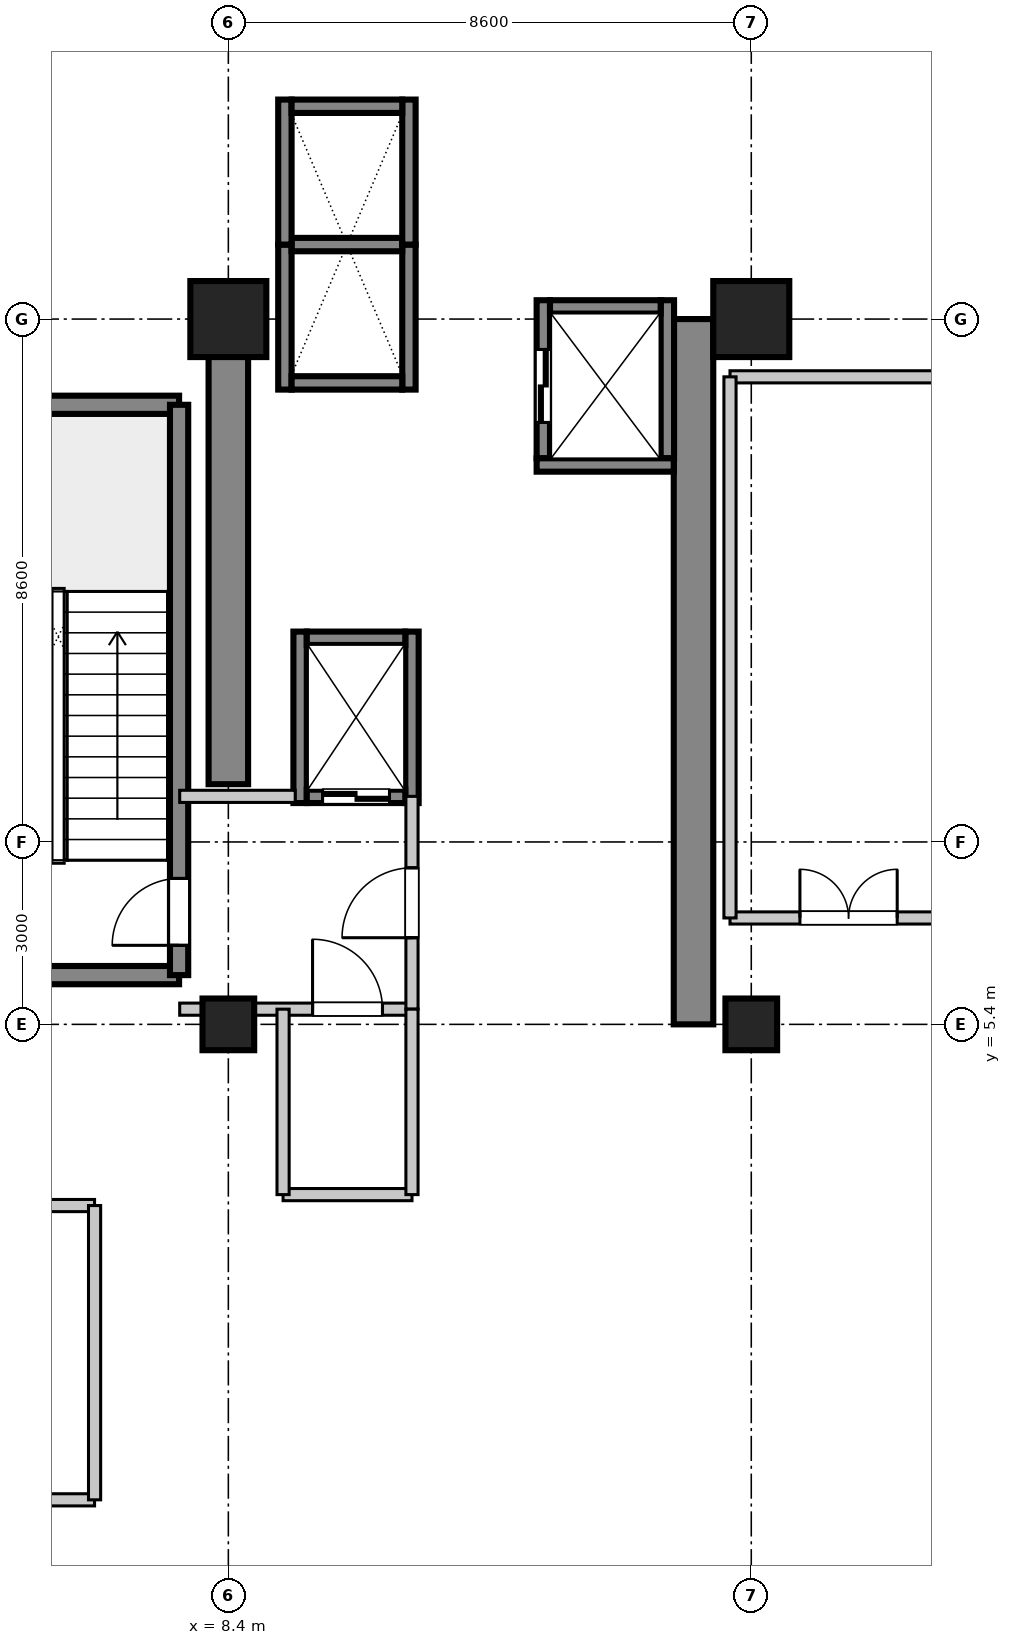
"""IFC4 building model, lengths in metres.
Left out: names, types, materials, properties, quantities, classifications, styles, units other than length and angle.
Written with IfcOpenShell. Run it as: python <this file> out.ifc"""

import sys

from ifc_helpers import new_model, si_unit, direction, frame, frame_2d, origin, origin_2d, place, context, subcontext, project, spatial, rectangle, i_section, extrude, source, transform, mapped, element, fill, save


model = new_model("IFC4")
c1 = context("Model", 3, precision=1e-05, world=origin(), true_north=direction((0.0, 1.0)))
c2 = subcontext(c1, "Body", "Model", "MODEL_VIEW")
j1 = project(units=[si_unit("LENGTHUNIT", "METRE"), si_unit("PLANEANGLEUNIT", "RADIAN")], contexts=[c1])
p1 = place(None, origin())
s1 = spatial("IfcSite", under=j1, at=p1, CompositionType="ELEMENT")
p2 = place(p1, origin())
s2 = spatial("IfcBuilding", under=s1, at=p2, CompositionType="ELEMENT")
p3 = place(p2, frame((0.0, 0.0, 144.2)))
s3 = spatial("IfcBuildingStorey", under=s2, at=p3, CompositionType="ELEMENT", Elevation=144.2)
m1 = source(origin(), c2, "Body", "SweptSolid", [
    extrude(rectangle(XDim=0.85, YDim=0.85, at=origin_2d()), origin(), (0.0, 0.0, 1.0), 4.755),
])
p4 = place(p3, frame((8.4, 5.4, 0.0), z_axis=(0.0, 0.0, 1.0), x_axis=(1.0, 0.0, 0.0)))
e1 = element("IfcColumn", 1, at=p4, inside=s3, PredefinedType="PILASTER", context=c2, shape_type="MappedRepresentation", body=[
    mapped(m1, transform((0.0, 0.0, 0.0), scale=1.0)),
])
m2 = source(origin(), c2, "Body", "SweptSolid", [
    extrude(rectangle(XDim=1.25, YDim=1.25, at=origin_2d()), origin(), (0.0, 0.0, 1.0), 4.755),
])
p5 = place(p3, frame((8.4, 17.0, 0.0), z_axis=(0.0, 0.0, 1.0), x_axis=(1.0, 0.0, 0.0)))
e2 = element("IfcColumn", 2, at=p5, inside=s3, PredefinedType="COLUMN", context=c2, shape_type="MappedRepresentation", body=[
    mapped(m2, transform((0.0, 0.0, 0.0), scale=1.0)),
])
p6 = place(p3, frame((17.0, 5.4, 0.0), z_axis=(0.0, 0.0, 1.0), x_axis=(1.0, 0.0, 0.0)))
e3 = element("IfcColumn", 3, at=p6, inside=s3, PredefinedType="PILASTER", context=c2, shape_type="MappedRepresentation", body=[
    mapped(m1, transform((0.0, 0.0, 0.0), scale=1.0)),
])
p7 = place(p3, frame((17.0, 17.0, 0.0), z_axis=(0.0, 0.0, 1.0), x_axis=(1.0, 0.0, 0.0)))
e4 = element("IfcColumn", 4, at=p7, inside=s3, PredefinedType="COLUMN", context=c2, shape_type="MappedRepresentation", body=[
    mapped(m2, transform((0.0, 0.0, 0.0), scale=1.0)),
])
m3 = source(origin(), c2, "Body", "SweptSolid", [
    extrude(i_section(OverallWidth=0.409, OverallDepth=0.43, WebThickness=0.021, FlangeThickness=0.034, at=origin_2d()), origin(), (0.0, 0.0, 1.0), 4.732),
])
p8 = place(p3, frame((20.45, 20.45, 0.0), z_axis=(-0.126773471153, -0.126773471153, 0.983797222005), x_axis=(0.991898611002, -0.008101388998, 0.126773471153)))
e5 = element("IfcColumn", 5, at=p8, inside=s3, PredefinedType="COLUMN", context=c2, shape_type="MappedRepresentation", body=[
    mapped(m3, transform((0.0, 0.0, 0.0), scale=1.0)),
])
m4 = source(origin(), c2, "Body", "SweptSolid", [
    extrude(rectangle(XDim=7.65, YDim=0.65, at=frame_2d((3.825, 0.0))), origin(), (0.0, 0.0, 1.0), 4.54),
])
p9 = place(p3, frame((8.4, 9.35, 0.0), z_axis=(0.0, 0.0, 1.0), x_axis=(0.0, 1.0, 0.0)))
e6 = element("IfcWall", 6, at=p9, inside=s3, PredefinedType="SHEAR", context=c2, shape_type="MappedRepresentation", body=[
    mapped(m4, transform((0.0, 0.0, 0.0), scale=1.0)),
])
m5 = source(origin(), c2, "Body", "SweptSolid", [
    extrude(rectangle(XDim=11.6, YDim=0.65, at=frame_2d((5.8, 0.0))), origin(), (0.0, 0.0, 1.0), 4.54),
])
p10 = place(p3, frame((16.05, 5.4, 0.0), z_axis=(0.0, 0.0, 1.0), x_axis=(0.0, 1.0, 0.0)))
e7 = element("IfcWall", 7, at=p10, inside=s3, PredefinedType="SHEAR", context=c2, shape_type="MappedRepresentation", body=[
    mapped(m5, transform((0.0, 0.0, 0.0), scale=1.0)),
])
m6 = source(origin(), c2, "Body", "SweptSolid", [
    extrude(rectangle(XDim=3.98, YDim=0.3, at=frame_2d((1.99, 0.0))), origin(), (0.0, 0.0, 1.0), 4.54),
])
for number, where, z_axis, x_axis in (
    (8, (3.61, 6.21, 0.0), (0.0, 0.0, 1.0), (1.0, 0.0, 0.0)),
    (9, (3.61, 15.59, 0.0), (0.0, 0.0, 1.0), (1.0, 0.0, 0.0)),
):
    element("IfcWall", number, at=place(p3, frame(where, z_axis=z_axis, x_axis=x_axis)), inside=s3, PredefinedType="SHEAR", context=c2, shape_type="MappedRepresentation", body=[
        mapped(m6, transform((0.0, 0.0, 0.0), scale=1.0)),
    ])
m7 = source(origin(), c2, "Body", "SweptSolid", [
    extrude(rectangle(XDim=9.38, YDim=0.3, at=frame_2d((4.69, 0.0))), origin(), (0.0, 0.0, 1.0), 4.54),
])
p11 = place(p3, frame((7.59, 6.21, 0.0), z_axis=(0.0, 0.0, 1.0), x_axis=(0.0, 1.0, 0.0)))
e10 = element("IfcWall", 10, at=p11, inside=s3, PredefinedType="SHEAR", context=c2, shape_type="MappedRepresentation", body=[
    mapped(m7, transform((0.0, 0.0, 0.0), scale=1.0)),
])
p12 = place(p11, frame((0.49, 0.0, 0.0)))
e11 = element("IfcOpeningElement", 11, at=p12, cuts=e10, PredefinedType="OPENING", context=c2, shape_type="SweptSolid", body=[
    extrude(rectangle(XDim=1.1, YDim=2.15, at=frame_2d((0.55, 1.075))), frame((0.0, 0.16, 0.0), z_axis=(0.0, -1.0, 0.0), x_axis=(1.0, 0.0, 0.0)), (0.0, 0.0, 1.0), 0.32),
])
m8 = source(origin(), c2, "Body", "SweptSolid", [
    extrude(rectangle(XDim=2.385, YDim=0.22, at=frame_2d((1.192, 0.0))), origin(), (0.0, 0.0, 1.0), 4.54),
])
for number, where, z_axis, x_axis in (
    (12, (9.33, 15.84, 0.0), (0.0, 0.0, 1.0), (0.0, 1.0, 0.0)),
    (13, (11.37, 15.84, 0.0), (0.0, 0.0, 1.0), (0.0, 1.0, 0.0)),
):
    element("IfcWall", number, at=place(p3, frame(where, z_axis=z_axis, x_axis=x_axis)), inside=s3, PredefinedType="SHEAR", context=c2, shape_type="MappedRepresentation", body=[
        mapped(m8, transform((0.0, 0.0, 0.0), scale=1.0)),
    ])
m9 = source(origin(), c2, "Body", "SweptSolid", [
    extrude(rectangle(XDim=1.82, YDim=0.22, at=frame_2d((0.91, 0.0))), origin(), (0.0, 0.0, 1.0), 4.54),
])
p13 = place(p3, frame((9.44, 15.95, 0.0), z_axis=(0.0, 0.0, 1.0), x_axis=(1.0, 0.0, 0.0)))
e14 = element("IfcWall", 14, at=p13, inside=s3, PredefinedType="SHEAR", context=c2, shape_type="MappedRepresentation", body=[
    mapped(m9, transform((0.0, 0.0, 0.0), scale=1.0)),
])
m10 = source(origin(), c2, "Body", "SweptSolid", [
    extrude(rectangle(XDim=1.82, YDim=0.22, at=frame_2d((0.91, 0.0))), origin(), (0.0, 0.0, 1.0), 4.8),
])
p14 = place(p3, frame((9.44, 18.225, 0.0), z_axis=(0.0, 0.0, 1.0), x_axis=(1.0, 0.0, 0.0)))
e15 = element("IfcWall", 15, at=p14, inside=s3, PredefinedType="SHEAR", context=c2, shape_type="MappedRepresentation", body=[
    mapped(m10, transform((0.0, 0.0, 0.0), scale=1.0)),
])
for number, where, z_axis, x_axis in (
    (16, (9.33, 18.225, 0.0), (0.0, 0.0, 1.0), (0.0, 1.0, 0.0)),
    (17, (11.37, 18.225, 0.0), (0.0, 0.0, 1.0), (0.0, 1.0, 0.0)),
):
    element("IfcWall", number, at=place(p3, frame(where, z_axis=z_axis, x_axis=x_axis)), inside=s3, PredefinedType="SHEAR", context=c2, shape_type="MappedRepresentation", body=[
        mapped(m8, transform((0.0, 0.0, 0.0), scale=1.0)),
    ])
p15 = place(p3, frame((9.44, 20.5, 0.0), z_axis=(0.0, 0.0, 1.0), x_axis=(1.0, 0.0, 0.0)))
e18 = element("IfcWall", 18, at=p15, inside=s3, PredefinedType="SHEAR", context=c2, shape_type="MappedRepresentation", body=[
    mapped(m9, transform((0.0, 0.0, 0.0), scale=1.0)),
])
m11 = source(origin(), c2, "Body", "SweptSolid", [
    extrude(rectangle(XDim=2.82, YDim=0.22, at=frame_2d((1.41, 0.0))), origin(), (0.0, 0.0, 1.0), 4.54),
])
for number, where, z_axis, x_axis in (
    (19, (9.58, 9.04, 0.0), (0.0, 0.0, 1.0), (0.0, 1.0, 0.0)),
    (20, (11.42, 9.04, 0.0), (0.0, 0.0, 1.0), (0.0, 1.0, 0.0)),
):
    element("IfcWall", number, at=place(p3, frame(where, z_axis=z_axis, x_axis=x_axis)), inside=s3, PredefinedType="SHEAR", context=c2, shape_type="MappedRepresentation", body=[
        mapped(m11, transform((0.0, 0.0, 0.0), scale=1.0)),
    ])
m12 = source(origin(), c2, "Body", "SweptSolid", [
    extrude(rectangle(XDim=1.62, YDim=0.22, at=frame_2d((0.81, 0.0))), origin(), (0.0, 0.0, 1.0), 4.54),
])
p16 = place(p3, frame((9.69, 9.15, 0.0), z_axis=(0.0, 0.0, 1.0), x_axis=(1.0, 0.0, 0.0)))
e21 = element("IfcWall", 21, at=p16, inside=s3, PredefinedType="SHEAR", context=c2, shape_type="MappedRepresentation", body=[
    mapped(m12, transform((0.0, 0.0, 0.0), scale=1.0)),
])
p17 = place(p16, frame((0.26, 0.0, 0.0)))
e22 = element("IfcOpeningElement", 22, at=p17, cuts=e21, PredefinedType="OPENING", context=c2, shape_type="SweptSolid", body=[
    extrude(rectangle(XDim=1.1, YDim=2.2, at=frame_2d((0.55, 1.1))), frame((0.0, 0.12, 0.0), z_axis=(0.0, -1.0, 0.0), x_axis=(1.0, 0.0, 0.0)), (0.0, 0.0, 1.0), 0.24),
])
p18 = place(p3, frame((9.69, 11.75, 0.0), z_axis=(0.0, 0.0, 1.0), x_axis=(1.0, 0.0, 0.0)))
e23 = element("IfcWall", 23, at=p18, inside=s3, PredefinedType="SHEAR", context=c2, shape_type="MappedRepresentation", body=[
    mapped(m12, transform((0.0, 0.0, 0.0), scale=1.0)),
])
m13 = source(origin(), c2, "Body", "SweptSolid", [
    extrude(rectangle(XDim=2.6, YDim=0.22, at=frame_2d((1.3, 0.0))), origin(), (0.0, 0.0, 1.0), 4.54),
])
p19 = place(p3, frame((13.58, 14.71, 0.0), z_axis=(0.0, 0.0, 1.0), x_axis=(0.0, 1.0, 0.0)))
e24 = element("IfcWall", 24, at=p19, inside=s3, PredefinedType="SHEAR", context=c2, shape_type="MappedRepresentation", body=[
    mapped(m13, transform((0.0, 0.0, 0.0), scale=1.0)),
])
p20 = place(p19, frame((0.59, 0.0, 0.0)))
e25 = element("IfcOpeningElement", 25, at=p20, cuts=e24, PredefinedType="OPENING", context=c2, shape_type="SweptSolid", body=[
    extrude(rectangle(XDim=1.2, YDim=2.2, at=frame_2d((0.6, 1.1))), frame((0.0, 0.12, 0.0), z_axis=(0.0, -1.0, 0.0), x_axis=(1.0, 0.0, 0.0)), (0.0, 0.0, 1.0), 0.24),
])
p21 = place(p3, frame((15.62, 14.71, 0.0), z_axis=(0.0, 0.0, 1.0), x_axis=(0.0, 1.0, 0.0)))
e26 = element("IfcWall", 26, at=p21, inside=s3, PredefinedType="SHEAR", context=c2, shape_type="MappedRepresentation", body=[
    mapped(m13, transform((0.0, 0.0, 0.0), scale=1.0)),
])
m14 = source(origin(), c2, "Body", "SweptSolid", [
    extrude(rectangle(XDim=2.255, YDim=0.22, at=frame_2d((1.127, 0.0))), origin(), (0.0, 0.0, 1.0), 4.54),
])
p22 = place(p3, frame((13.47, 14.6, 0.0), z_axis=(0.0, 0.0, 1.0), x_axis=(1.0, 0.0, 0.0)))
e27 = element("IfcWall", 27, at=p22, inside=s3, PredefinedType="SHEAR", context=c2, shape_type="MappedRepresentation", body=[
    mapped(m14, transform((0.0, 0.0, 0.0), scale=1.0)),
])
p23 = place(p3, frame((13.69, 17.2, 0.0), z_axis=(0.0, 0.0, 1.0), x_axis=(1.0, 0.0, 0.0)))
e28 = element("IfcWall", 28, at=p23, inside=s3, PredefinedType="SHEAR", context=c2, shape_type="MappedRepresentation", body=[
    mapped(m9, transform((0.0, 0.0, 0.0), scale=1.0)),
])
m15 = source(origin(), c2, "Body", "SweptSolid", [
    extrude(rectangle(XDim=3.82, YDim=0.2, at=frame_2d((1.91, 0.0))), origin(), (0.0, 0.0, 1.0), 3.4),
])
p24 = place(p3, frame((7.6, 5.65, 0.0), z_axis=(0.0, 0.0, 1.0), x_axis=(1.0, 0.0, 0.0)))
e29 = element("IfcWall", 29, at=p24, inside=s3, PredefinedType="PARTITIONING", context=c2, shape_type="MappedRepresentation", body=[
    mapped(m15, transform((0.0, 0.0, 0.0), scale=1.0)),
])
p25 = place(p24, frame((2.185, 0.0, 0.0)))
e30 = element("IfcOpeningElement", 30, at=p25, cuts=e29, PredefinedType="OPENING", context=c2, shape_type="SweptSolid", body=[
    extrude(rectangle(XDim=1.15, YDim=2.15, at=frame_2d((0.575, 1.075))), frame((0.0, 0.11, 0.0), z_axis=(0.0, -1.0, 0.0), x_axis=(1.0, 0.0, 0.0)), (0.0, 0.0, 1.0), 0.22),
])
m16 = source(origin(), c2, "Body", "SweptSolid", [
    extrude(rectangle(XDim=1.9, YDim=0.2, at=frame_2d((0.95, 0.0))), origin(), (0.0, 0.0, 1.0), 3.4),
])
p26 = place(p3, frame((7.6, 9.15, 0.0), z_axis=(0.0, 0.0, 1.0), x_axis=(1.0, 0.0, 0.0)))
e31 = element("IfcWall", 31, at=p26, inside=s3, PredefinedType="PARTITIONING", context=c2, shape_type="MappedRepresentation", body=[
    mapped(m16, transform((0.0, 0.0, 0.0), scale=1.0)),
])
m17 = source(origin(), c2, "Body", "SweptSolid", [
    extrude(rectangle(XDim=3.5, YDim=0.2, at=frame_2d((1.75, 0.0))), origin(), (0.0, 0.0, 1.0), 3.4),
])
p27 = place(p3, frame((11.42, 5.65, 0.0), z_axis=(0.0, 0.0, 1.0), x_axis=(0.0, 1.0, 0.0)))
e32 = element("IfcWall", 32, at=p27, inside=s3, PredefinedType="PARTITIONING", context=c2, shape_type="MappedRepresentation", body=[
    mapped(m17, transform((0.0, 0.0, 0.0), scale=1.0)),
])
p28 = place(p27, frame((1.175, 0.0, 0.0)))
e33 = element("IfcOpeningElement", 33, at=p28, cuts=e32, PredefinedType="OPENING", context=c2, shape_type="SweptSolid", body=[
    extrude(rectangle(XDim=1.15, YDim=2.15, at=frame_2d((0.575, 1.075))), frame((0.0, 0.11, 0.0), z_axis=(0.0, -1.0, 0.0), x_axis=(1.0, 0.0, 0.0)), (0.0, 0.0, 1.0), 0.22),
])
m18 = source(origin(), c2, "Body", "SweptSolid", [
    extrude(rectangle(XDim=2.12, YDim=0.2, at=frame_2d((1.06, 0.0))), origin(), (0.0, 0.0, 1.0), 3.4),
])
p29 = place(p3, frame((9.3, 2.6, 0.0), z_axis=(0.0, 0.0, 1.0), x_axis=(1.0, 0.0, 0.0)))
e34 = element("IfcWall", 34, at=p29, inside=s3, PredefinedType="PARTITIONING", context=c2, shape_type="MappedRepresentation", body=[
    mapped(m18, transform((0.0, 0.0, 0.0), scale=1.0)),
])
m19 = source(origin(), c2, "Body", "SweptSolid", [
    extrude(rectangle(XDim=3.05, YDim=0.2, at=frame_2d((1.525, 0.0))), origin(), (0.0, 0.0, 1.0), 3.4),
])
for number, where, z_axis, x_axis in (
    (35, (9.3, 2.6, 0.0), (0.0, 0.0, 1.0), (0.0, 1.0, 0.0)),
    (36, (11.42, 2.6, 0.0), (0.0, 0.0, 1.0), (0.0, 1.0, 0.0)),
):
    element("IfcWall", number, at=place(p3, frame(where, z_axis=z_axis, x_axis=x_axis)), inside=s3, PredefinedType="PARTITIONING", context=c2, shape_type="MappedRepresentation", body=[
        mapped(m19, transform((0.0, 0.0, 0.0), scale=1.0)),
    ])
m20 = source(origin(), c2, "Body", "SweptSolid", [
    extrude(rectangle(XDim=15.3, YDim=0.2, at=frame_2d((7.65, 0.0))), origin(), (0.0, 0.0, 1.0), 3.4),
])
p30 = place(p3, frame((-9.1, -2.42, 0.0), z_axis=(0.0, 0.0, 1.0), x_axis=(1.0, 0.0, 0.0)))
e37 = element("IfcWall", 37, at=p30, inside=s3, PredefinedType="PARTITIONING", context=c2, shape_type="MappedRepresentation", body=[
    mapped(m20, transform((0.0, 0.0, 0.0), scale=1.0)),
])
p31 = place(p3, frame((-9.1, 2.42, 0.0), z_axis=(0.0, 0.0, 1.0), x_axis=(1.0, 0.0, 0.0)))
e38 = element("IfcWall", 38, at=p31, inside=s3, PredefinedType="PARTITIONING", context=c2, shape_type="MappedRepresentation", body=[
    mapped(m20, transform((0.0, 0.0, 0.0), scale=1.0)),
])
p32 = place(p31, frame((8.525, 0.0, 0.0)))
e39 = element("IfcOpeningElement", 39, at=p32, cuts=e38, PredefinedType="OPENING", context=c2, shape_type="SweptSolid", body=[
    extrude(rectangle(XDim=1.15, YDim=2.15, at=frame_2d((0.575, 1.075))), frame((0.0, 0.11, 0.0), z_axis=(0.0, -1.0, 0.0), x_axis=(1.0, 0.0, 0.0)), (0.0, 0.0, 1.0), 0.22),
])
m21 = source(origin(), c2, "Body", "SweptSolid", [
    extrude(rectangle(XDim=4.84, YDim=0.2, at=frame_2d((2.42, 0.0))), origin(), (0.0, 0.0, 1.0), 3.4),
])
p33 = place(p3, frame((6.2, -2.42, 0.0), z_axis=(0.0, 0.0, 1.0), x_axis=(0.0, 1.0, 0.0)))
e40 = element("IfcWall", 40, at=p33, inside=s3, PredefinedType="PARTITIONING", context=c2, shape_type="MappedRepresentation", body=[
    mapped(m21, transform((0.0, 0.0, 0.0), scale=1.0)),
])
m22 = source(origin(), c2, "Body", "SweptSolid", [
    extrude(rectangle(XDim=6.17, YDim=0.2, at=frame_2d((3.085, 0.0))), origin(), (0.0, 0.0, 1.0), 3.4),
])
p34 = place(p3, frame((16.65, 7.15, 0.0), z_axis=(0.0, 0.0, 1.0), x_axis=(1.0, 0.0, 0.0)))
e41 = element("IfcWall", 41, at=p34, inside=s3, PredefinedType="PARTITIONING", context=c2, shape_type="MappedRepresentation", body=[
    mapped(m22, transform((0.0, 0.0, 0.0), scale=1.0)),
])
p35 = place(p34, frame((1.15, 0.0, 0.0)))
e42 = element("IfcOpeningElement", 42, at=p35, cuts=e41, PredefinedType="OPENING", context=c2, shape_type="SweptSolid", body=[
    extrude(rectangle(XDim=1.6, YDim=2.15, at=frame_2d((0.8, 1.075))), frame((0.0, 0.11, 0.0), z_axis=(0.0, -1.0, 0.0), x_axis=(1.0, 0.0, 0.0)), (0.0, 0.0, 1.0), 0.22),
])
p36 = place(p3, frame((16.65, 16.05, 0.0), z_axis=(0.0, 0.0, 1.0), x_axis=(1.0, 0.0, 0.0)))
e43 = element("IfcWall", 43, at=p36, inside=s3, PredefinedType="PARTITIONING", context=c2, shape_type="MappedRepresentation", body=[
    mapped(m22, transform((0.0, 0.0, 0.0), scale=1.0)),
])
m23 = source(origin(), c2, "Body", "SweptSolid", [
    extrude(rectangle(XDim=8.9, YDim=0.2, at=frame_2d((4.45, 0.0))), origin(), (0.0, 0.0, 1.0), 3.4),
])
p37 = place(p3, frame((16.65, 7.15, 0.0), z_axis=(0.0, 0.0, 1.0), x_axis=(0.0, 1.0, 0.0)))
e44 = element("IfcWall", 44, at=p37, inside=s3, PredefinedType="PARTITIONING", context=c2, shape_type="MappedRepresentation", body=[
    mapped(m23, transform((0.0, 0.0, 0.0), scale=1.0)),
])
m24 = source(origin(), c2, "Body", "SweptSolid", [
    extrude(rectangle(XDim=1.1, YDim=2.15, at=frame_2d((0.55, 1.075))), frame((0.0, 0.025, 0.0), z_axis=(0.0, -1.0, 0.0), x_axis=(1.0, 0.0, 0.0)), (0.0, 0.0, 1.0), 0.05),
])
p38 = place(p12, origin())
e45 = element("IfcDoor", 45, at=p38, inside=s3, OperationType="SINGLE_SWING_LEFT", PredefinedType="DOOR", context=c2, shape_type="MappedRepresentation", body=[
    mapped(m24, transform((0.0, 0.0, 0.0), scale=1.0)),
])
fill(e11, e45)
m25 = source(origin(), c2, "Body", "SweptSolid", [
    extrude(rectangle(XDim=1.1, YDim=2.2, at=frame_2d((0.55, 1.1))), frame((0.0, 0.025, 0.0), z_axis=(0.0, -1.0, 0.0), x_axis=(1.0, 0.0, 0.0)), (0.0, 0.0, 1.0), 0.05),
])
p39 = place(p17, frame((1.1, 0.0, 0.0), z_axis=(0.0, 0.0, 1.0), x_axis=(-1.0, 0.0, 0.0)))
e46 = element("IfcDoor", 46, at=p39, inside=s3, OperationType="DOUBLE_DOOR_SLIDING", PredefinedType="DOOR", context=c2, shape_type="MappedRepresentation", body=[
    mapped(m25, transform((0.0, 0.0, 0.0), scale=1.0)),
])
fill(e22, e46)
m26 = source(origin(), c2, "Body", "SweptSolid", [
    extrude(rectangle(XDim=1.2, YDim=2.2, at=frame_2d((0.6, 1.1))), frame((0.0, 0.025, 0.0), z_axis=(0.0, -1.0, 0.0), x_axis=(1.0, 0.0, 0.0)), (0.0, 0.0, 1.0), 0.05),
])
p40 = place(p20, origin())
e47 = element("IfcDoor", 47, at=p40, inside=s3, OperationType="DOUBLE_DOOR_SLIDING", PredefinedType="DOOR", context=c2, shape_type="MappedRepresentation", body=[
    mapped(m26, transform((0.0, 0.0, 0.0), scale=1.0)),
])
fill(e25, e47)
m27 = source(origin(), c2, "Body", "SweptSolid", [
    extrude(rectangle(XDim=1.15, YDim=2.15, at=frame_2d((0.575, 1.075))), frame((0.0, 0.025, 0.0), z_axis=(0.0, -1.0, 0.0), x_axis=(1.0, 0.0, 0.0)), (0.0, 0.0, 1.0), 0.05),
])
p41 = place(p28, frame((1.15, 0.0, 0.0), z_axis=(0.0, 0.0, 1.0), x_axis=(-1.0, 0.0, 0.0)))
e48 = element("IfcDoor", 48, at=p41, inside=s3, OperationType="SINGLE_SWING_LEFT", PredefinedType="DOOR", context=c2, shape_type="MappedRepresentation", body=[
    mapped(m27, transform((0.0, 0.0, 0.0), scale=1.0)),
])
fill(e33, e48)
p42 = place(p25, frame((1.15, 0.0, 0.0), z_axis=(0.0, 0.0, 1.0), x_axis=(-1.0, 0.0, 0.0)))
e49 = element("IfcDoor", 49, at=p42, inside=s3, OperationType="SINGLE_SWING_LEFT", PredefinedType="DOOR", context=c2, shape_type="MappedRepresentation", body=[
    mapped(m27, transform((0.0, 0.0, 0.0), scale=1.0)),
])
fill(e30, e49)
m28 = source(origin(), c2, "Body", "SweptSolid", [
    extrude(rectangle(XDim=1.6, YDim=2.15, at=frame_2d((0.8, 1.075))), frame((0.0, 0.025, 0.0), z_axis=(0.0, -1.0, 0.0), x_axis=(1.0, 0.0, 0.0)), (0.0, 0.0, 1.0), 0.05),
])
p43 = place(p35, origin())
e50 = element("IfcDoor", 50, at=p43, inside=s3, OperationType="DOUBLE_DOOR_SINGLE_SWING", PredefinedType="DOOR", context=c2, shape_type="MappedRepresentation", body=[
    mapped(m28, transform((0.0, 0.0, 0.0), scale=1.0)),
])
fill(e42, e50)
save(model, sys.argv[1])
